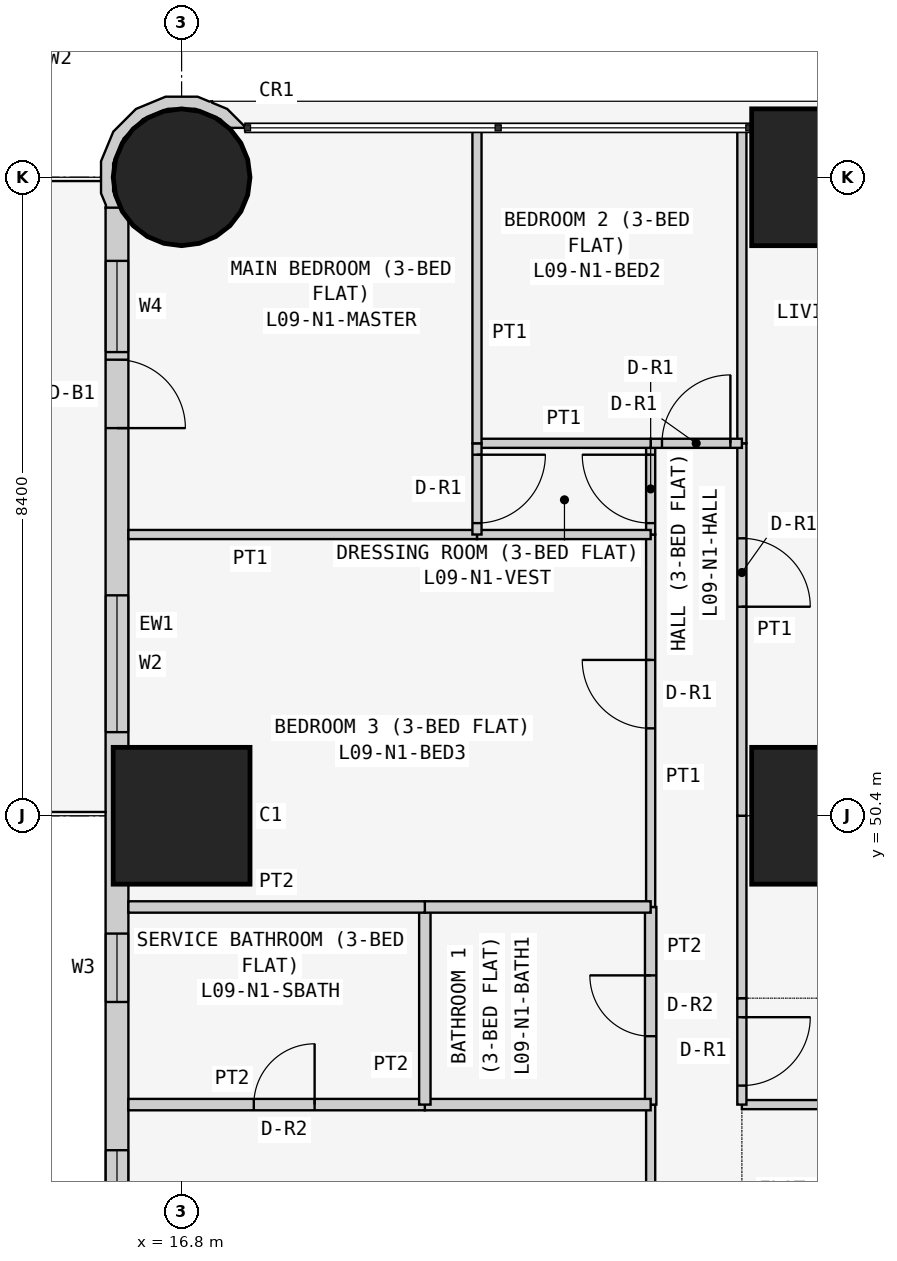
"""IFC4 building model, lengths in metres.
Left out: names, types, materials, properties, quantities, classifications, styles, units other than length and angle.
Written with IfcOpenShell. Run it as: python <this file> out.ifc"""

import sys

from ifc_helpers import new_model, si_unit, direction, frame, frame_2d, origin, origin_2d, place, context, subcontext, project, spatial, polyline, rectangle, circle, outline, extrude, element, fill, save


model = new_model("IFC4")
c1 = context("Model", 3, precision=1e-05, world=origin(), true_north=direction((0.0, 1.0)))
c2 = subcontext(c1, "Body", "Model", "MODEL_VIEW")
j1 = project(units=[si_unit("LENGTHUNIT", "METRE"), si_unit("PLANEANGLEUNIT", "RADIAN")], contexts=[c1])
p1 = place(None, origin())
s1 = spatial("IfcSite", under=j1, at=p1, CompositionType="ELEMENT")
p2 = place(p1, origin())
s2 = spatial("IfcBuilding", under=s1, at=p2, CompositionType="ELEMENT")
p3 = place(p2, frame((0.0, 0.0, 41.7)))
s3 = spatial("IfcBuildingStorey", under=s2, at=p3, CompositionType="ELEMENT", Elevation=41.7)
p4 = place(p3, frame((16.8, 50.4, 0.0), z_axis=(0.0, 0.0, 1.0), x_axis=(1.0, 0.0, 0.0)))
e1 = element("IfcColumn", 1, at=p4, inside=s3, PredefinedType="COLUMN", context=c2, shape_type="SweptSolid", body=[
    extrude(rectangle(XDim=1.8, YDim=1.8, at=origin_2d()), origin(), (0.0, 0.0, 1.0), 3.6),
])
p5 = place(p3, frame((16.8, 58.8, 0.0), z_axis=(0.0, 0.0, 1.0), x_axis=(1.0, 0.0, 0.0)))
e2 = element("IfcColumn", 2, at=p5, inside=s3, PredefinedType="COLUMN", context=c2, shape_type="SweptSolid", body=[
    extrude(circle(Radius=0.9, at=origin_2d()), origin(), (0.0, 0.0, 1.0), 3.6),
])
for number, where, z_axis, x_axis in (
    (3, (25.2, 50.4, 0.0), (0.0, 0.0, 1.0), (1.0, 0.0, 0.0)),
    (4, (25.2, 58.8, 0.0), (0.0, 0.0, 1.0), (1.0, 0.0, 0.0)),
):
    element("IfcColumn", number, at=place(p3, frame(where, z_axis=z_axis, x_axis=x_axis)), inside=s3, PredefinedType="COLUMN", context=c2, shape_type="SweptSolid", body=[
        extrude(rectangle(XDim=1.8, YDim=1.8, at=origin_2d()), origin(), (0.0, 0.0, 1.0), 3.6),
    ])
p6 = place(p3, frame((15.95, 58.4, 0.0), z_axis=(0.0, 0.0, 1.0), x_axis=(0.0, -1.0, 0.0)))
e5 = element("IfcWall", 5, at=p6, inside=s3, PredefinedType="SOLIDWALL", context=c2, shape_type="SweptSolid", body=[
    extrude(rectangle(XDim=15.7, YDim=0.3, at=frame_2d((7.85, 0.0))), origin(), (0.0, 0.0, 1.0), 3.45),
])
p7 = place(p6, frame((12.4, 0.0, 0.9)))
e6 = element("IfcOpeningElement", 6, at=p7, cuts=e5, PredefinedType="OPENING", context=c2, shape_type="SweptSolid", body=[
    extrude(rectangle(XDim=1.8, YDim=1.5, at=frame_2d((0.9, 0.75))), frame((0.0, 0.16, 0.0), z_axis=(0.0, -1.0, 0.0), x_axis=(1.0, 0.0, 0.0)), (0.0, 0.0, 1.0), 0.32),
])
p8 = place(p6, frame((9.55, 0.0, 1.5)))
e7 = element("IfcOpeningElement", 7, at=p8, cuts=e5, PredefinedType="OPENING", context=c2, shape_type="SweptSolid", body=[
    extrude(rectangle(XDim=0.9, YDim=0.7, at=frame_2d((0.45, 0.35))), frame((0.0, 0.16, 0.0), z_axis=(0.0, -1.0, 0.0), x_axis=(1.0, 0.0, 0.0)), (0.0, 0.0, 1.0), 0.32),
])
p9 = place(p6, frame((5.1, 0.0, 0.9)))
e8 = element("IfcOpeningElement", 8, at=p9, cuts=e5, PredefinedType="OPENING", context=c2, shape_type="SweptSolid", body=[
    extrude(rectangle(XDim=1.8, YDim=1.5, at=frame_2d((0.9, 0.75))), frame((0.0, 0.16, 0.0), z_axis=(0.0, -1.0, 0.0), x_axis=(1.0, 0.0, 0.0)), (0.0, 0.0, 1.0), 0.32),
])
p10 = place(p6, frame((2.0, 0.0, 0.0)))
e9 = element("IfcOpeningElement", 9, at=p10, cuts=e5, PredefinedType="OPENING", context=c2, shape_type="SweptSolid", body=[
    extrude(rectangle(XDim=0.9, YDim=2.4, at=frame_2d((0.45, 1.2))), frame((0.0, 0.16, 0.0), z_axis=(0.0, -1.0, 0.0), x_axis=(1.0, 0.0, 0.0)), (0.0, 0.0, 1.0), 0.32),
])
p11 = place(p6, frame((0.7, 0.0, 0.9)))
e10 = element("IfcOpeningElement", 10, at=p11, cuts=e5, PredefinedType="OPENING", context=c2, shape_type="SweptSolid", body=[
    extrude(rectangle(XDim=1.2, YDim=1.5, at=frame_2d((0.6, 0.75))), frame((0.0, 0.16, 0.0), z_axis=(0.0, -1.0, 0.0), x_axis=(1.0, 0.0, 0.0)), (0.0, 0.0, 1.0), 0.32),
])
p12 = place(p3, frame((17.567, 59.411, 0.0), z_axis=(0.0, 0.0, 1.0), x_axis=(-0.377204953059, 0.926129809145, 0.0)))
e11 = element("IfcWall", 11, at=p12, inside=s3, PredefinedType="SOLIDWALL", context=c2, shape_type="SweptSolid", body=[
    extrude(outline(polyline([(-0.27, 2.017), (-0.37, 1.841), (-0.102, 1.842), (0.23, 1.707), (0.484, 1.455), (0.624, 1.125), (0.626, 0.766), (0.491, 0.434), (0.239, 0.18), (0.09, 0.117), (0.011, -0.078), (0.024, -0.083), (0.329, 0.045), (0.48, 0.198), (0.499, 0.193), (0.508, 0.225), (0.626, 0.345), (0.785, 0.736), (0.782, 1.157), (0.619, 1.546), (0.319, 1.842), (-0.072, 2.002), (-0.24, 2.0), (-0.27, 2.017)])), origin(), (0.0, 0.0, 1.0), 3.45),
])
p13 = place(p3, frame((29.4, 46.6, 0.0), z_axis=(0.0, 0.0, 1.0), x_axis=(-1.0, 0.0, 0.0)))
e12 = element("IfcWall", 12, at=p13, inside=s3, PredefinedType="PARTITIONING", context=c2, shape_type="SweptSolid", body=[
    extrude(rectangle(XDim=5.229, YDim=0.12, at=frame_2d((2.615, 0.0))), origin(), (0.0, 0.0, 1.0), 3.45),
])
p14 = place(p3, frame((24.171, 48.0, 0.0), z_axis=(0.0, 0.0, 1.0), x_axis=(0.0, -1.0, 0.0)))
e13 = element("IfcWall", 13, at=p14, inside=s3, PredefinedType="PARTITIONING", context=c2, shape_type="SweptSolid", body=[
    extrude(rectangle(XDim=1.4, YDim=0.12, at=frame_2d((0.7, 0.0))), origin(), (0.0, 0.0, 1.0), 3.45),
])
p15 = place(p14, frame((0.25, 0.0, 0.0)))
e14 = element("IfcOpeningElement", 14, at=p15, cuts=e13, PredefinedType="OPENING", context=c2, shape_type="SweptSolid", body=[
    extrude(rectangle(XDim=0.9, YDim=2.1, at=frame_2d((0.45, 1.05))), frame((0.0, 0.07, 0.0), z_axis=(0.0, -1.0, 0.0), x_axis=(1.0, 0.0, 0.0)), (0.0, 0.0, 1.0), 0.14),
])
p16 = place(p3, frame((24.171, 50.4, 0.0), z_axis=(0.0, 0.0, 1.0), x_axis=(0.0, -1.0, 0.0)))
e15 = element("IfcWall", 15, at=p16, inside=s3, PredefinedType="PARTITIONING", context=c2, shape_type="SweptSolid", body=[
    extrude(rectangle(XDim=2.4, YDim=0.12, at=frame_2d((1.2, 0.0))), origin(), (0.0, 0.0, 1.0), 3.45),
])
p17 = place(p3, frame((24.171, 55.3, 0.0), z_axis=(0.0, 0.0, 1.0), x_axis=(0.0, -1.0, 0.0)))
e16 = element("IfcWall", 16, at=p17, inside=s3, PredefinedType="PARTITIONING", context=c2, shape_type="SweptSolid", body=[
    extrude(rectangle(XDim=4.9, YDim=0.12, at=frame_2d((2.45, 0.0))), origin(), (0.0, 0.0, 1.0), 3.45),
])
p18 = place(p17, frame((1.25, 0.0, 0.0)))
e17 = element("IfcOpeningElement", 17, at=p18, cuts=e16, PredefinedType="OPENING", context=c2, shape_type="SweptSolid", body=[
    extrude(rectangle(XDim=0.9, YDim=2.1, at=frame_2d((0.45, 1.05))), frame((0.0, 0.07, 0.0), z_axis=(0.0, -1.0, 0.0), x_axis=(1.0, 0.0, 0.0)), (0.0, 0.0, 1.0), 0.14),
])
p19 = place(p3, frame((24.171, 59.45, 0.0), z_axis=(0.0, 0.0, 1.0), x_axis=(0.0, -1.0, 0.0)))
e18 = element("IfcWall", 18, at=p19, inside=s3, PredefinedType="PARTITIONING", context=c2, shape_type="SweptSolid", body=[
    extrude(rectangle(XDim=4.15, YDim=0.12, at=frame_2d((2.075, 0.0))), origin(), (0.0, 0.0, 1.0), 3.45),
])
p20 = place(p3, frame((22.971, 46.6, 0.0), z_axis=(0.0, 0.0, 1.0), x_axis=(0.0, -1.0, 0.0)))
e19 = element("IfcWall", 19, at=p20, inside=s3, PredefinedType="PARTITIONING", context=c2, shape_type="SweptSolid", body=[
    extrude(rectangle(XDim=3.575, YDim=0.12, at=frame_2d((1.788, 0.0))), origin(), (0.0, 0.0, 1.0), 3.45),
])
p21 = place(p20, frame((1.35, 0.0, 0.0)))
e20 = element("IfcOpeningElement", 20, at=p21, cuts=e19, PredefinedType="OPENING", context=c2, shape_type="SweptSolid", body=[
    extrude(rectangle(XDim=0.9, YDim=2.1, at=frame_2d((0.45, 1.05))), frame((0.0, 0.07, 0.0), z_axis=(0.0, -1.0, 0.0), x_axis=(1.0, 0.0, 0.0)), (0.0, 0.0, 1.0), 0.14),
])
p22 = place(p3, frame((22.971, 49.2, 0.0), z_axis=(0.0, 0.0, 1.0), x_axis=(0.0, -1.0, 0.0)))
e21 = element("IfcWall", 21, at=p22, inside=s3, PredefinedType="PARTITIONING", context=c2, shape_type="SweptSolid", body=[
    extrude(rectangle(XDim=2.6, YDim=0.15, at=frame_2d((1.3, 0.0))), origin(), (0.0, 0.0, 1.0), 3.45),
])
p23 = place(p22, frame((0.9, 0.0, 0.0)))
e22 = element("IfcOpeningElement", 22, at=p23, cuts=e21, PredefinedType="OPENING", context=c2, shape_type="SweptSolid", body=[
    extrude(rectangle(XDim=0.8, YDim=2.1, at=frame_2d((0.4, 1.05))), frame((0.0, 0.085, 0.0), z_axis=(0.0, -1.0, 0.0), x_axis=(1.0, 0.0, 0.0)), (0.0, 0.0, 1.0), 0.17),
])
p24 = place(p3, frame((22.971, 54.1, 0.0), z_axis=(0.0, 0.0, 1.0), x_axis=(0.0, -1.0, 0.0)))
e23 = element("IfcWall", 23, at=p24, inside=s3, PredefinedType="PARTITIONING", context=c2, shape_type="SweptSolid", body=[
    extrude(rectangle(XDim=4.9, YDim=0.12, at=frame_2d((2.45, 0.0))), origin(), (0.0, 0.0, 1.0), 3.45),
])
p25 = place(p24, frame((1.65, 0.0, 0.0)))
e24 = element("IfcOpeningElement", 24, at=p25, cuts=e23, PredefinedType="OPENING", context=c2, shape_type="SweptSolid", body=[
    extrude(rectangle(XDim=0.9, YDim=2.1, at=frame_2d((0.45, 1.05))), frame((0.0, 0.07, 0.0), z_axis=(0.0, -1.0, 0.0), x_axis=(1.0, 0.0, 0.0)), (0.0, 0.0, 1.0), 0.14),
])
p26 = place(p3, frame((22.971, 55.3, 0.0), z_axis=(0.0, 0.0, 1.0), x_axis=(0.0, -1.0, 0.0)))
e25 = element("IfcWall", 25, at=p26, inside=s3, PredefinedType="PARTITIONING", context=c2, shape_type="SweptSolid", body=[
    extrude(rectangle(XDim=1.2, YDim=0.12, at=frame_2d((0.6, 0.0))), origin(), (0.0, 0.0, 1.0), 3.45),
])
p27 = place(p26, frame((0.15, 0.0, 0.0)))
e26 = element("IfcOpeningElement", 26, at=p27, cuts=e25, PredefinedType="OPENING", context=c2, shape_type="SweptSolid", body=[
    extrude(rectangle(XDim=0.9, YDim=2.1, at=frame_2d((0.45, 1.05))), frame((0.0, 0.07, 0.0), z_axis=(0.0, -1.0, 0.0), x_axis=(1.0, 0.0, 0.0)), (0.0, 0.0, 1.0), 0.14),
])
p28 = place(p3, frame((24.171, 55.3, 0.0), z_axis=(0.0, 0.0, 1.0), x_axis=(-1.0, 0.0, 0.0)))
e27 = element("IfcWall", 27, at=p28, inside=s3, PredefinedType="PARTITIONING", context=c2, shape_type="SweptSolid", body=[
    extrude(rectangle(XDim=1.2, YDim=0.12, at=frame_2d((0.6, 0.0))), origin(), (0.0, 0.0, 1.0), 3.45),
])
p29 = place(p28, frame((0.151, 0.0, 0.0)))
e28 = element("IfcOpeningElement", 28, at=p29, cuts=e27, PredefinedType="OPENING", context=c2, shape_type="SweptSolid", body=[
    extrude(rectangle(XDim=0.9, YDim=2.1, at=frame_2d((0.45, 1.05))), frame((0.0, 0.07, 0.0), z_axis=(0.0, -1.0, 0.0), x_axis=(1.0, 0.0, 0.0)), (0.0, 0.0, 1.0), 0.14),
])
p30 = place(p3, frame((22.971, 46.6, 0.0), z_axis=(0.0, 0.0, 1.0), x_axis=(-1.0, 0.0, 0.0)))
e29 = element("IfcWall", 29, at=p30, inside=s3, PredefinedType="PARTITIONING", context=c2, shape_type="SweptSolid", body=[
    extrude(rectangle(XDim=2.971, YDim=0.15, at=frame_2d((1.485, 0.0))), origin(), (0.0, 0.0, 1.0), 3.45),
])
p31 = place(p3, frame((20.0, 46.6, 0.0), z_axis=(0.0, 0.0, 1.0), x_axis=(-1.0, 0.0, 0.0)))
e30 = element("IfcWall", 30, at=p31, inside=s3, PredefinedType="PARTITIONING", context=c2, shape_type="SweptSolid", body=[
    extrude(rectangle(XDim=3.9, YDim=0.15, at=frame_2d((1.95, 0.0))), origin(), (0.0, 0.0, 1.0), 3.45),
])
p32 = place(p31, frame((1.45, 0.0, 0.0)))
e31 = element("IfcOpeningElement", 31, at=p32, cuts=e30, PredefinedType="OPENING", context=c2, shape_type="SweptSolid", body=[
    extrude(rectangle(XDim=0.8, YDim=2.1, at=frame_2d((0.4, 1.05))), frame((0.0, 0.085, 0.0), z_axis=(0.0, -1.0, 0.0), x_axis=(1.0, 0.0, 0.0)), (0.0, 0.0, 1.0), 0.17),
])
p33 = place(p3, frame((20.0, 49.2, 0.0), z_axis=(0.0, 0.0, 1.0), x_axis=(0.0, -1.0, 0.0)))
e32 = element("IfcWall", 32, at=p33, inside=s3, PredefinedType="PARTITIONING", context=c2, shape_type="SweptSolid", body=[
    extrude(rectangle(XDim=2.6, YDim=0.15, at=frame_2d((1.3, 0.0))), origin(), (0.0, 0.0, 1.0), 3.45),
])
p34 = place(p3, frame((22.971, 49.2, 0.0), z_axis=(0.0, 0.0, 1.0), x_axis=(-1.0, 0.0, 0.0)))
e33 = element("IfcWall", 33, at=p34, inside=s3, PredefinedType="PARTITIONING", context=c2, shape_type="SweptSolid", body=[
    extrude(rectangle(XDim=2.971, YDim=0.15, at=frame_2d((1.485, 0.0))), origin(), (0.0, 0.0, 1.0), 3.45),
])
p35 = place(p3, frame((20.0, 49.2, 0.0), z_axis=(0.0, 0.0, 1.0), x_axis=(-1.0, 0.0, 0.0)))
e34 = element("IfcWall", 34, at=p35, inside=s3, PredefinedType="PARTITIONING", context=c2, shape_type="SweptSolid", body=[
    extrude(rectangle(XDim=3.9, YDim=0.15, at=frame_2d((1.95, 0.0))), origin(), (0.0, 0.0, 1.0), 3.45),
])
p36 = place(p3, frame((22.971, 54.1, 0.0), z_axis=(0.0, 0.0, 1.0), x_axis=(-1.0, 0.0, 0.0)))
e35 = element("IfcWall", 35, at=p36, inside=s3, PredefinedType="PARTITIONING", context=c2, shape_type="SweptSolid", body=[
    extrude(rectangle(XDim=2.285, YDim=0.12, at=frame_2d((1.143, 0.0))), origin(), (0.0, 0.0, 1.0), 3.45),
])
p37 = place(p3, frame((20.686, 54.1, 0.0), z_axis=(0.0, 0.0, 1.0), x_axis=(-1.0, 0.0, 0.0)))
e36 = element("IfcWall", 36, at=p37, inside=s3, PredefinedType="PARTITIONING", context=c2, shape_type="SweptSolid", body=[
    extrude(rectangle(XDim=4.586, YDim=0.12, at=frame_2d((2.293, 0.0))), origin(), (0.0, 0.0, 1.0), 3.45),
])
p38 = place(p3, frame((22.971, 55.3, 0.0), z_axis=(0.0, 0.0, 1.0), x_axis=(-1.0, 0.0, 0.0)))
e37 = element("IfcWall", 37, at=p38, inside=s3, PredefinedType="PARTITIONING", context=c2, shape_type="SweptSolid", body=[
    extrude(rectangle(XDim=2.285, YDim=0.12, at=frame_2d((1.143, 0.0))), origin(), (0.0, 0.0, 1.0), 3.45),
])
p39 = place(p3, frame((20.686, 55.3, 0.0), z_axis=(0.0, 0.0, 1.0), x_axis=(0.0, -1.0, 0.0)))
e38 = element("IfcWall", 38, at=p39, inside=s3, PredefinedType="PARTITIONING", context=c2, shape_type="SweptSolid", body=[
    extrude(rectangle(XDim=1.2, YDim=0.12, at=frame_2d((0.6, 0.0))), origin(), (0.0, 0.0, 1.0), 3.45),
])
p40 = place(p39, frame((0.15, 0.0, 0.0)))
e39 = element("IfcOpeningElement", 39, at=p40, cuts=e38, PredefinedType="OPENING", context=c2, shape_type="SweptSolid", body=[
    extrude(rectangle(XDim=0.9, YDim=2.1, at=frame_2d((0.45, 1.05))), frame((0.0, 0.07, 0.0), z_axis=(0.0, -1.0, 0.0), x_axis=(1.0, 0.0, 0.0)), (0.0, 0.0, 1.0), 0.14),
])
p41 = place(p3, frame((20.686, 59.45, 0.0), z_axis=(0.0, 0.0, 1.0), x_axis=(0.0, -1.0, 0.0)))
e40 = element("IfcWall", 40, at=p41, inside=s3, PredefinedType="PARTITIONING", context=c2, shape_type="SweptSolid", body=[
    extrude(rectangle(XDim=4.15, YDim=0.12, at=frame_2d((2.075, 0.0))), origin(), (0.0, 0.0, 1.0), 3.45),
])
p42 = place(p7, origin())
e41 = element("IfcWindow", 41, at=p42, inside=s3, PartitioningType="SINGLE_PANEL", PredefinedType="WINDOW", context=c2, shape_type="SweptSolid", body=[
    extrude(rectangle(XDim=1.8, YDim=1.5, at=frame_2d((0.9, 0.75))), frame((0.0, 0.03, 0.0), z_axis=(0.0, -1.0, 0.0), x_axis=(1.0, 0.0, 0.0)), (0.0, 0.0, 1.0), 0.06),
])
fill(e6, e41)
p43 = place(p8, origin())
e42 = element("IfcWindow", 42, at=p43, inside=s3, PartitioningType="SINGLE_PANEL", PredefinedType="WINDOW", context=c2, shape_type="SweptSolid", body=[
    extrude(rectangle(XDim=0.9, YDim=0.7, at=frame_2d((0.45, 0.35))), frame((0.0, 0.03, 0.0), z_axis=(0.0, -1.0, 0.0), x_axis=(1.0, 0.0, 0.0)), (0.0, 0.0, 1.0), 0.06),
])
fill(e7, e42)
p44 = place(p9, origin())
e43 = element("IfcWindow", 43, at=p44, inside=s3, PartitioningType="SINGLE_PANEL", PredefinedType="WINDOW", context=c2, shape_type="SweptSolid", body=[
    extrude(rectangle(XDim=1.8, YDim=1.5, at=frame_2d((0.9, 0.75))), frame((0.0, 0.03, 0.0), z_axis=(0.0, -1.0, 0.0), x_axis=(1.0, 0.0, 0.0)), (0.0, 0.0, 1.0), 0.06),
])
fill(e8, e43)
p45 = place(p10, origin())
e44 = element("IfcDoor", 44, at=p45, inside=s3, OperationType="SINGLE_SWING_RIGHT", PredefinedType="DOOR", context=c2, shape_type="SweptSolid", body=[
    extrude(rectangle(XDim=0.9, YDim=2.4, at=frame_2d((0.45, 1.2))), frame((0.0, 0.025, 0.0), z_axis=(0.0, -1.0, 0.0), x_axis=(1.0, 0.0, 0.0)), (0.0, 0.0, 1.0), 0.05),
])
fill(e9, e44)
p46 = place(p11, origin())
e45 = element("IfcWindow", 45, at=p46, inside=s3, PartitioningType="SINGLE_PANEL", PredefinedType="WINDOW", context=c2, shape_type="SweptSolid", body=[
    extrude(rectangle(XDim=1.2, YDim=1.5, at=frame_2d((0.6, 0.75))), frame((0.0, 0.03, 0.0), z_axis=(0.0, -1.0, 0.0), x_axis=(1.0, 0.0, 0.0)), (0.0, 0.0, 1.0), 0.06),
])
fill(e10, e45)
p47 = place(p15, origin())
e46 = element("IfcDoor", 46, at=p47, inside=s3, OperationType="SINGLE_SWING_LEFT", PredefinedType="DOOR", context=c2, shape_type="SweptSolid", body=[
    extrude(rectangle(XDim=0.9, YDim=2.1, at=frame_2d((0.45, 1.05))), frame((0.0, 0.025, 0.0), z_axis=(0.0, -1.0, 0.0), x_axis=(1.0, 0.0, 0.0)), (0.0, 0.0, 1.0), 0.05),
])
fill(e14, e46)
p48 = place(p18, origin())
e47 = element("IfcDoor", 47, at=p48, inside=s3, OperationType="SINGLE_SWING_RIGHT", PredefinedType="DOOR", context=c2, shape_type="SweptSolid", body=[
    extrude(rectangle(XDim=0.9, YDim=2.1, at=frame_2d((0.45, 1.05))), frame((0.0, 0.025, 0.0), z_axis=(0.0, -1.0, 0.0), x_axis=(1.0, 0.0, 0.0)), (0.0, 0.0, 1.0), 0.05),
])
fill(e17, e47)
p49 = place(p32, frame((0.8, 0.0, 0.0), z_axis=(0.0, 0.0, 1.0), x_axis=(-1.0, 0.0, 0.0)))
e48 = element("IfcDoor", 48, at=p49, inside=s3, OperationType="SINGLE_SWING_RIGHT", PredefinedType="DOOR", context=c2, shape_type="SweptSolid", body=[
    extrude(rectangle(XDim=0.8, YDim=2.1, at=frame_2d((0.4, 1.05))), frame((0.0, 0.025, 0.0), z_axis=(0.0, -1.0, 0.0), x_axis=(1.0, 0.0, 0.0)), (0.0, 0.0, 1.0), 0.05),
])
fill(e31, e48)
p50 = place(p23, frame((0.8, 0.0, 0.0), z_axis=(0.0, 0.0, 1.0), x_axis=(-1.0, 0.0, 0.0)))
e49 = element("IfcDoor", 49, at=p50, inside=s3, OperationType="SINGLE_SWING_RIGHT", PredefinedType="DOOR", context=c2, shape_type="SweptSolid", body=[
    extrude(rectangle(XDim=0.8, YDim=2.1, at=frame_2d((0.4, 1.05))), frame((0.0, 0.025, 0.0), z_axis=(0.0, -1.0, 0.0), x_axis=(1.0, 0.0, 0.0)), (0.0, 0.0, 1.0), 0.05),
])
fill(e22, e49)
p51 = place(p25, frame((0.9, 0.0, 0.0), z_axis=(0.0, 0.0, 1.0), x_axis=(-1.0, 0.0, 0.0)))
e50 = element("IfcDoor", 50, at=p51, inside=s3, OperationType="SINGLE_SWING_RIGHT", PredefinedType="DOOR", context=c2, shape_type="SweptSolid", body=[
    extrude(rectangle(XDim=0.9, YDim=2.1, at=frame_2d((0.45, 1.05))), frame((0.0, 0.025, 0.0), z_axis=(0.0, -1.0, 0.0), x_axis=(1.0, 0.0, 0.0)), (0.0, 0.0, 1.0), 0.05),
])
fill(e24, e50)
p52 = place(p27, frame((0.9, 0.0, 0.0), z_axis=(0.0, 0.0, 1.0), x_axis=(-1.0, 0.0, 0.0)))
e51 = element("IfcDoor", 51, at=p52, inside=s3, OperationType="SINGLE_SWING_RIGHT", PredefinedType="DOOR", context=c2, shape_type="SweptSolid", body=[
    extrude(rectangle(XDim=0.9, YDim=2.1, at=frame_2d((0.45, 1.05))), frame((0.0, 0.025, 0.0), z_axis=(0.0, -1.0, 0.0), x_axis=(1.0, 0.0, 0.0)), (0.0, 0.0, 1.0), 0.05),
])
fill(e26, e51)
p53 = place(p40, origin())
e52 = element("IfcDoor", 52, at=p53, inside=s3, OperationType="SINGLE_SWING_LEFT", PredefinedType="DOOR", context=c2, shape_type="SweptSolid", body=[
    extrude(rectangle(XDim=0.9, YDim=2.1, at=frame_2d((0.45, 1.05))), frame((0.0, 0.025, 0.0), z_axis=(0.0, -1.0, 0.0), x_axis=(1.0, 0.0, 0.0)), (0.0, 0.0, 1.0), 0.05),
])
fill(e39, e52)
p54 = place(p29, frame((0.9, 0.0, 0.0), z_axis=(0.0, 0.0, 1.0), x_axis=(-1.0, 0.0, 0.0)))
e53 = element("IfcDoor", 53, at=p54, inside=s3, OperationType="SINGLE_SWING_RIGHT", PredefinedType="DOOR", context=c2, shape_type="SweptSolid", body=[
    extrude(rectangle(XDim=0.9, YDim=2.1, at=frame_2d((0.45, 1.05))), frame((0.0, 0.025, 0.0), z_axis=(0.0, -1.0, 0.0), x_axis=(1.0, 0.0, 0.0)), (0.0, 0.0, 1.0), 0.05),
])
fill(e28, e53)
save(model, sys.argv[1])
